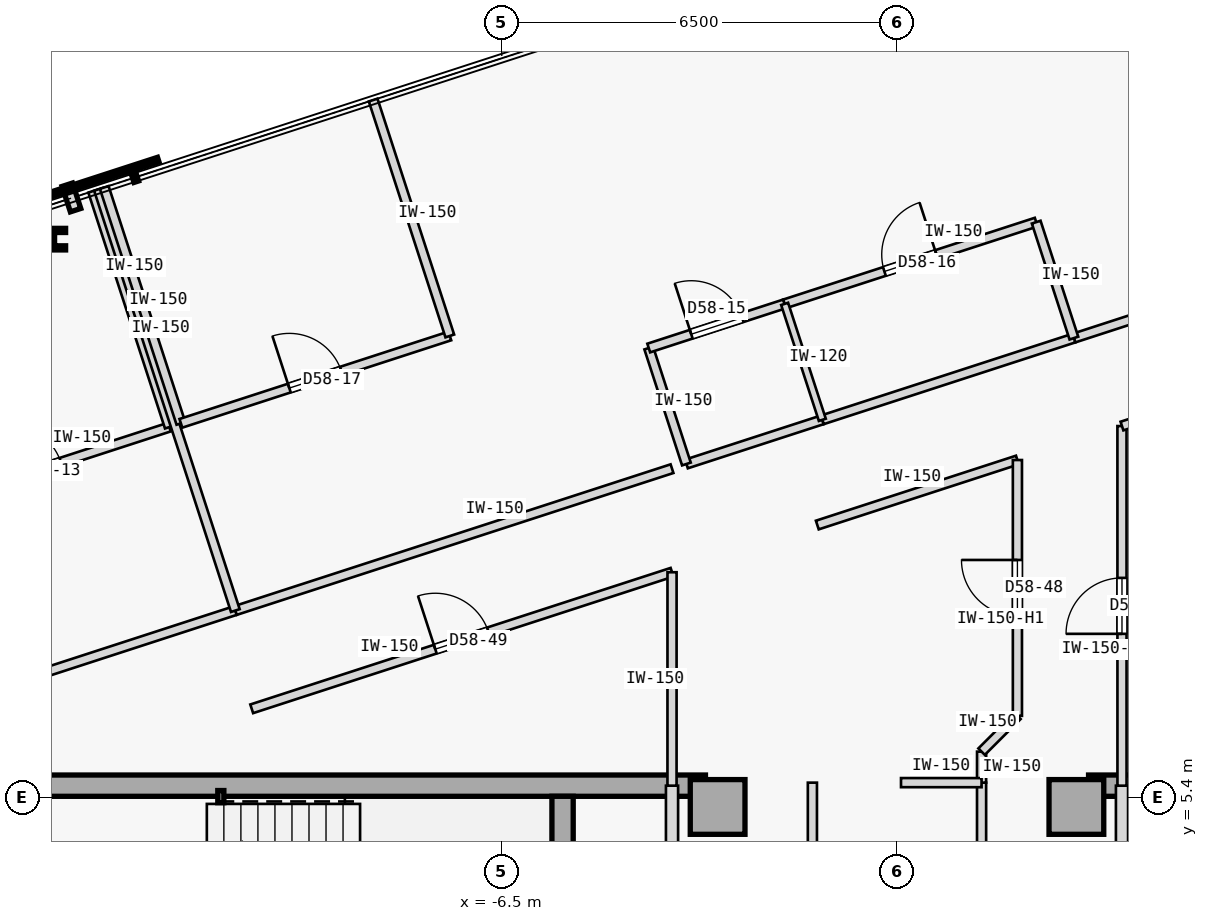
"""IFC4 building model, lengths in metres.
Left out: names, types, materials, properties, quantities, classifications, styles, units other than length and angle.
Written with IfcOpenShell. Run it as: python <this file> out.ifc"""

import sys

from ifc_helpers import new_model, si_unit, direction, frame, frame_2d, origin, origin_2d, place, context, subcontext, project, spatial, rectangle, hollow_rectangle, i_section, extrude, element, fill, save


model = new_model("IFC4")
c1 = context("Model", 3, precision=1e-05, world=origin(), true_north=direction((0.0, 1.0)))
c2 = subcontext(c1, "Body", "Model", "MODEL_VIEW")
j1 = project(units=[si_unit("LENGTHUNIT", "METRE"), si_unit("PLANEANGLEUNIT", "RADIAN")], contexts=[c1])
p1 = place(None, origin())
s1 = spatial("IfcSite", under=j1, at=p1, CompositionType="ELEMENT")
p2 = place(p1, origin())
s2 = spatial("IfcBuilding", under=s1, at=p2, CompositionType="ELEMENT")
p3 = place(p2, frame((0.0, 0.0, 220.95)))
s3 = spatial("IfcBuildingStorey", under=s2, at=p3, CompositionType="ELEMENT", Elevation=220.95)
for number, where, z_axis, x_axis in (
    (1, (-2.95, 5.25, 0.0), (0.0, 0.0, 1.0), (1.0, 0.0, 0.0)),
    (2, (2.95, 5.25, 0.0), (0.0, 0.0, 1.0), (1.0, 0.0, 0.0)),
):
    element("IfcColumn", number, at=place(p3, frame(where, z_axis=z_axis, x_axis=x_axis)), inside=s3, PredefinedType="COLUMN", context=c2, shape_type="SweptSolid", body=[
        extrude(rectangle(XDim=0.9, YDim=0.9, at=origin_2d()), origin(), (0.0, 0.0, 1.0), 3.35),
    ])
p4 = place(p3, frame((-14.56, 5.6, 0.0), z_axis=(0.0, 0.0, 1.0), x_axis=(1.0, 0.0, 0.0)))
e3 = element("IfcWall", 3, at=p4, inside=s3, PredefinedType="SHEAR", context=c2, shape_type="SweptSolid", body=[
    extrude(rectangle(XDim=11.41, YDim=0.35, at=frame_2d((5.705, 0.0))), origin(), (0.0, 0.0, 1.0), 3.125),
])
p5 = place(p3, frame((-5.5, 2.15, 0.0), z_axis=(0.0, 0.0, 1.0), x_axis=(0.0, 1.0, 0.0)))
e4 = element("IfcWall", 4, at=p5, inside=s3, PredefinedType="SHEAR", context=c2, shape_type="SweptSolid", body=[
    extrude(rectangle(XDim=3.275, YDim=0.35, at=frame_2d((1.638, 0.0))), origin(), (0.0, 0.0, 1.0), 3.125),
])
p6 = place(p3, frame((3.15, 5.6, 0.0), z_axis=(0.0, 0.0, 1.0), x_axis=(1.0, 0.0, 0.0)))
e5 = element("IfcWall", 5, at=p6, inside=s3, PredefinedType="SHEAR", context=c2, shape_type="SweptSolid", body=[
    extrude(rectangle(XDim=11.41, YDim=0.35, at=frame_2d((5.705, 0.0))), origin(), (0.0, 0.0, 1.0), 3.125),
])
p7 = place(p3, frame((-11.12, 5.42, 0.0), z_axis=(0.0, 0.0, 1.0), x_axis=(1.0, 0.0, 0.0)))
e6 = element("IfcColumn", 6, at=p7, inside=s3, PredefinedType="COLUMN", context=c2, shape_type="SweptSolid", body=[
    extrude(hollow_rectangle(XDim=0.1, YDim=0.2, WallThickness=0.008, at=origin_2d()), origin(), (0.0, 0.0, 1.0), 3.35),
])
p8 = place(p3, frame((-13.875, 14.587, 0.0), z_axis=(0.0, 0.0, 1.0), x_axis=(1.0, 0.0, 0.0)))
e7 = element("IfcColumn", 7, at=p8, inside=s3, PredefinedType="COLUMN", context=c2, shape_type="SweptSolid", body=[
    extrude(i_section(OverallWidth=0.405, OverallDepth=0.355, WebThickness=0.042, FlangeThickness=0.068, FilletRadius=0.015, at=origin_2d()), origin(), (0.0, 0.0, 1.0), 3.35),
])
p9 = place(p3, frame((-3.7, -1.15, 0.0), z_axis=(0.0, 0.0, 1.0), x_axis=(0.0, 1.0, 0.0)))
e8 = element("IfcWall", 8, at=p9, inside=s3, PredefinedType="STANDARD", context=c2, shape_type="SweptSolid", body=[
    extrude(rectangle(XDim=6.75, YDim=0.2, at=frame_2d((3.375, 0.0))), origin(), (0.0, 0.0, 1.0), 3.125),
])
p10 = place(p9, frame((1.1, 0.0, 0.0)))
e9 = element("IfcOpeningElement", 9, at=p10, cuts=e8, PredefinedType="OPENING", context=c2, shape_type="SweptSolid", body=[
    extrude(rectangle(XDim=0.9, YDim=2.15, at=frame_2d((0.45, 1.075))), frame((0.0, 0.11, 0.0), z_axis=(0.0, -1.0, 0.0), x_axis=(1.0, 0.0, 0.0)), (0.0, 0.0, 1.0), 0.22),
])
p11 = place(p9, frame((4.0, 0.0, 0.0)))
e10 = element("IfcOpeningElement", 10, at=p11, cuts=e8, PredefinedType="OPENING", context=c2, shape_type="SweptSolid", body=[
    extrude(rectangle(XDim=0.92, YDim=2.15, at=frame_2d((0.46, 1.075))), frame((0.0, 0.11, 0.0), z_axis=(0.0, -1.0, 0.0), x_axis=(1.0, 0.0, 0.0)), (0.0, 0.0, 1.0), 0.22),
])
p12 = place(p3, frame((3.7, -1.15, 0.0), z_axis=(0.0, 0.0, 1.0), x_axis=(0.0, 1.0, 0.0)))
e11 = element("IfcWall", 11, at=p12, inside=s3, PredefinedType="STANDARD", context=c2, shape_type="SweptSolid", body=[
    extrude(rectangle(XDim=6.75, YDim=0.2, at=frame_2d((3.375, 0.0))), origin(), (0.0, 0.0, 1.0), 3.125),
])
p13 = place(p12, frame((0.35, 0.0, 0.0)))
e12 = element("IfcOpeningElement", 12, at=p13, cuts=e11, PredefinedType="OPENING", context=c2, shape_type="SweptSolid", body=[
    extrude(rectangle(XDim=0.88, YDim=2.15, at=frame_2d((0.44, 1.075))), frame((0.0, 0.11, 0.0), z_axis=(0.0, -1.0, 0.0), x_axis=(1.0, 0.0, 0.0)), (0.0, 0.0, 1.0), 0.22),
])
p14 = place(p12, frame((2.55, 0.0, 0.0)))
e13 = element("IfcOpeningElement", 13, at=p14, cuts=e11, PredefinedType="OPENING", context=c2, shape_type="SweptSolid", body=[
    extrude(rectangle(XDim=0.92, YDim=2.15, at=frame_2d((0.46, 1.075))), frame((0.0, 0.11, 0.0), z_axis=(0.0, -1.0, 0.0), x_axis=(1.0, 0.0, 0.0)), (0.0, 0.0, 1.0), 0.22),
])
p15 = place(p12, frame((4.22, 0.0, 0.0)))
e14 = element("IfcOpeningElement", 14, at=p15, cuts=e11, PredefinedType="OPENING", context=c2, shape_type="SweptSolid", body=[
    extrude(rectangle(XDim=0.88, YDim=2.15, at=frame_2d((0.44, 1.075))), frame((0.0, 0.11, 0.0), z_axis=(0.0, -1.0, 0.0), x_axis=(1.0, 0.0, 0.0)), (0.0, 0.0, 1.0), 0.22),
])
p16 = place(p3, frame((-1.391, -5.65, 0.0), z_axis=(0.0, 0.0, 1.0), x_axis=(-8.6422954e-05, 0.999999996266, 0.0)))
e15 = element("IfcWall", 15, at=p16, inside=s3, PredefinedType="PARTITIONING", context=c2, shape_type="SweptSolid", body=[
    extrude(rectangle(XDim=11.3, YDim=0.15, at=frame_2d((5.65, 0.0))), origin(), (0.0, 0.0, 1.0), 3.125),
])
p17 = place(p16, frame((5.175, 0.0, 0.0)))
e16 = element("IfcOpeningElement", 16, at=p17, cuts=e15, PredefinedType="OPENING", context=c2, shape_type="SweptSolid", body=[
    extrude(rectangle(XDim=0.95, YDim=2.15, at=frame_2d((0.475, 1.075))), frame((0.0, 0.085, 0.0), z_axis=(0.0, -1.0, 0.0), x_axis=(1.0, 0.0, 0.0)), (0.0, 0.0, 1.0), 0.17),
])
p18 = place(p3, frame((1.391, -5.648, 0.0), z_axis=(0.0, 0.0, 1.0), x_axis=(-4.3218947e-05, 0.999999999066, 0.0)))
e17 = element("IfcWall", 17, at=p18, inside=s3, PredefinedType="PARTITIONING", context=c2, shape_type="SweptSolid", body=[
    extrude(rectangle(XDim=11.298, YDim=0.15, at=frame_2d((5.649, 0.0))), origin(), (0.0, 0.0, 1.0), 3.125),
])
p19 = place(p3, frame((-24.022, 4.21, 0.0), z_axis=(0.0, 0.0, 1.0), x_axis=(0.951058997127, 0.309009359055, 0.0)))
e18 = element("IfcWall", 18, at=p19, inside=s3, PredefinedType="PARTITIONING", context=c2, shape_type="SweptSolid", body=[
    extrude(rectangle(XDim=13.817, YDim=0.15, at=frame_2d((6.908, 0.0))), origin(), (0.0, 0.0, 1.0), 3.125),
])
p20 = place(p19, frame((6.434, 0.0, 0.0)))
e19 = element("IfcOpeningElement", 19, at=p20, cuts=e18, PredefinedType="OPENING", context=c2, shape_type="SweptSolid", body=[
    extrude(rectangle(XDim=0.95, YDim=2.15, at=frame_2d((0.475, 1.075))), frame((0.0, 0.085, 0.0), z_axis=(0.0, -1.0, 0.0), x_axis=(1.0, 0.0, 0.0)), (0.0, 0.0, 1.0), 0.17),
])
p21 = place(p3, frame((-10.882, 8.479, 0.0), z_axis=(0.0, 0.0, 1.0), x_axis=(0.951051887333, 0.309031240494, 0.0)))
e20 = element("IfcWall", 20, at=p21, inside=s3, PredefinedType="PARTITIONING", context=c2, shape_type="SweptSolid", body=[
    extrude(rectangle(XDim=7.551, YDim=0.15, at=frame_2d((3.775, 0.0))), origin(), (0.0, 0.0, 1.0), 3.125),
])
p22 = place(p3, frame((2.909, 12.96, 0.0), z_axis=(0.0, 0.0, 1.0), x_axis=(0.951056113966, 0.309018232614, 0.0)))
e21 = element("IfcWall", 21, at=p22, inside=s3, PredefinedType="PARTITIONING", context=c2, shape_type="SweptSolid", body=[
    extrude(rectangle(XDim=21.076, YDim=0.15, at=frame_2d((10.538, 0.0))), origin(), (0.0, 0.0, 1.0), 3.125),
])
p23 = place(p22, frame((10.063, 0.0, 0.0)))
e22 = element("IfcOpeningElement", 22, at=p23, cuts=e21, PredefinedType="OPENING", context=c2, shape_type="SweptSolid", body=[
    extrude(rectangle(XDim=0.95, YDim=2.15, at=frame_2d((0.475, 1.075))), frame((0.0, 0.085, 0.0), z_axis=(0.0, -1.0, 0.0), x_axis=(1.0, 0.0, 0.0)), (0.0, 0.0, 1.0), 0.17),
])
p24 = place(p3, frame((-3.463, 10.89, 0.0), z_axis=(0.0, 0.0, 1.0), x_axis=(0.951045519245, 0.309050837767, 0.0)))
e23 = element("IfcWall", 23, at=p24, inside=s3, PredefinedType="PARTITIONING", context=c2, shape_type="SweptSolid", body=[
    extrude(rectangle(XDim=2.35, YDim=0.15, at=frame_2d((1.175, 0.0))), origin(), (0.0, 0.0, 1.0), 3.125),
])
p25 = place(p3, frame((-1.228, 11.616, 0.0), z_axis=(0.0, 0.0, 1.0), x_axis=(0.951069122051, 0.308978195154, 0.0)))
e24 = element("IfcWall", 24, at=p25, inside=s3, PredefinedType="PARTITIONING", context=c2, shape_type="SweptSolid", body=[
    extrude(rectangle(XDim=4.35, YDim=0.15, at=frame_2d((2.175, 0.0))), origin(), (0.0, 0.0, 1.0), 3.125),
])
p26 = place(p3, frame((3.7, 5.6, 0.0), z_axis=(0.0, 0.0, 1.0), x_axis=(-0.000123839008, 0.999999992332, 0.0)))
e25 = element("IfcWall", 25, at=p26, inside=s3, PredefinedType="PARTITIONING", context=c2, shape_type="SweptSolid", body=[
    extrude(rectangle(XDim=5.914, YDim=0.15, at=frame_2d((2.957, 0.0))), origin(), (0.0, 0.0, 1.0), 2.675),
])
p27 = place(p26, frame((2.497, 0.0, 0.0)))
e26 = element("IfcOpeningElement", 26, at=p27, cuts=e25, PredefinedType="OPENING", context=c2, shape_type="SweptSolid", body=[
    extrude(rectangle(XDim=0.92, YDim=2.15, at=frame_2d((0.46, 1.075))), frame((0.0, 0.085, 0.0), z_axis=(0.0, -1.0, 0.0), x_axis=(1.0, 0.0, 0.0)), (0.0, 0.0, 1.0), 0.17),
])
p28 = place(p3, frame((3.699, 11.514, 0.0), z_axis=(0.0, 0.0, 1.0), x_axis=(0.951069540665, 0.308976906612, 0.0)))
e27 = element("IfcWall", 27, at=p28, inside=s3, PredefinedType="PARTITIONING", context=c2, shape_type="SweptSolid", body=[
    extrude(rectangle(XDim=1.871, YDim=0.15, at=frame_2d((0.936, 0.0))), origin(), (0.0, 0.0, 1.0), 3.125),
])
p29 = place(p3, frame((-1.311, 9.886, 0.0), z_axis=(0.0, 0.0, 1.0), x_axis=(0.951068803905, 0.308979174442, 0.0)))
e28 = element("IfcWall", 28, at=p29, inside=s3, PredefinedType="PARTITIONING", context=c2, shape_type="SweptSolid", body=[
    extrude(rectangle(XDim=3.46, YDim=0.15, at=frame_2d((1.73, 0.0))), origin(), (0.0, 0.0, 1.0), 3.125),
])
p30 = place(p3, frame((1.391, 5.649, 0.0), z_axis=(0.0, 0.0, 1.0), x_axis=(0.000957395444, 0.999999541697, 0.0)))
e29 = element("IfcWall", 29, at=p30, inside=s3, PredefinedType="PARTITIONING", context=c2, shape_type="SweptSolid", body=[
    extrude(rectangle(XDim=0.51, YDim=0.15, at=frame_2d((0.255, 0.0))), origin(), (0.0, 0.0, 1.0), 3.125),
])
p31 = place(p3, frame((1.391, 6.159, 0.0), z_axis=(0.0, 0.0, 1.0), x_axis=(0.707106781187, 0.707106781187, 0.0)))
e30 = element("IfcWall", 30, at=p31, inside=s3, PredefinedType="PARTITIONING", context=c2, shape_type="SweptSolid", body=[
    extrude(rectangle(XDim=0.833, YDim=0.15, at=frame_2d((0.417, 0.0))), origin(), (0.0, 0.0, 1.0), 3.125),
])
p32 = place(p3, frame((1.98, 6.748, 0.0), z_axis=(0.0, 0.0, 1.0), x_axis=(0.0, 1.0, 0.0)))
e31 = element("IfcWall", 31, at=p32, inside=s3, PredefinedType="PARTITIONING", context=c2, shape_type="SweptSolid", body=[
    extrude(rectangle(XDim=4.207, YDim=0.15, at=frame_2d((2.104, 0.0))), origin(), (0.0, 0.0, 1.0), 2.675),
])
p33 = place(p32, frame((1.643, 0.0, 0.0)))
e32 = element("IfcOpeningElement", 32, at=p33, cuts=e31, PredefinedType="OPENING", context=c2, shape_type="SweptSolid", body=[
    extrude(rectangle(XDim=0.92, YDim=2.15, at=frame_2d((0.46, 1.075))), frame((0.0, 0.085, 0.0), z_axis=(0.0, -1.0, 0.0), x_axis=(1.0, 0.0, 0.0)), (0.0, 0.0, 1.0), 0.17),
])
p34 = place(p3, frame((-10.612, 6.864, 0.0), z_axis=(0.0, 0.0, 1.0), x_axis=(0.951060972078, 0.309003280548, 0.0)))
e33 = element("IfcWall", 33, at=p34, inside=s3, PredefinedType="PARTITIONING", context=c2, shape_type="SweptSolid", body=[
    extrude(rectangle(XDim=7.268, YDim=0.15, at=frame_2d((3.634, 0.0))), origin(), (0.0, 0.0, 1.0), 3.125),
])
p35 = place(p34, frame((3.174, 0.0, 0.0)))
e34 = element("IfcOpeningElement", 34, at=p35, cuts=e33, PredefinedType="OPENING", context=c2, shape_type="SweptSolid", body=[
    extrude(rectangle(XDim=0.92, YDim=2.15, at=frame_2d((0.46, 1.075))), frame((0.0, 0.085, 0.0), z_axis=(0.0, -1.0, 0.0), x_axis=(1.0, 0.0, 0.0)), (0.0, 0.0, 1.0), 0.17),
])
p36 = place(p3, frame((-3.7, 5.6, 0.0), z_axis=(0.0, 0.0, 1.0), x_axis=(0.000139120755, 0.999999990323, 0.0)))
e35 = element("IfcWall", 35, at=p36, inside=s3, PredefinedType="PARTITIONING", context=c2, shape_type="SweptSolid", body=[
    extrude(rectangle(XDim=3.51, YDim=0.15, at=frame_2d((1.755, 0.0))), origin(), (0.0, 0.0, 1.0), 3.125),
])
p37 = place(p3, frame((0.066, 5.65, 0.0), z_axis=(0.0, 0.0, 1.0), x_axis=(0.999999932094, -0.000368527707, 0.0)))
e36 = element("IfcWall", 36, at=p37, inside=s3, PredefinedType="PARTITIONING", context=c2, shape_type="SweptSolid", body=[
    extrude(rectangle(XDim=1.325, YDim=0.15, at=frame_2d((0.663, 0.0))), origin(), (0.0, 0.0, 1.0), 3.125),
])
p38 = place(p3, frame((-16.389, 10.06, 0.0), z_axis=(0.0, 0.0, 1.0), x_axis=(0.951050272606, 0.309036209813, 0.0)))
e37 = element("IfcWall", 37, at=p38, inside=s3, PredefinedType="PARTITIONING", context=c2, shape_type="SweptSolid", body=[
    extrude(rectangle(XDim=4.65, YDim=0.15, at=frame_2d((2.325, 0.0))), origin(), (0.0, 0.0, 1.0), 3.125),
])
p39 = place(p38, frame((1.875, 0.0, 0.0)))
e38 = element("IfcOpeningElement", 38, at=p39, cuts=e37, PredefinedType="OPENING", context=c2, shape_type="SweptSolid", body=[
    extrude(rectangle(XDim=0.9, YDim=2.15, at=frame_2d((0.45, 1.075))), frame((0.0, 0.085, 0.0), z_axis=(0.0, -1.0, 0.0), x_axis=(1.0, 0.0, 0.0)), (0.0, 0.0, 1.0), 0.17),
])
p40 = place(p3, frame((-11.967, 11.497, 0.0), z_axis=(0.0, 0.0, 1.0), x_axis=(-0.309018403393, 0.951056058476, 0.0)))
e39 = element("IfcWall", 39, at=p40, inside=s3, PredefinedType="PARTITIONING", context=c2, shape_type="SweptSolid", body=[
    extrude(rectangle(XDim=4.079, YDim=0.15, at=frame_2d((2.04, 0.0))), origin(), (0.0, 0.0, 1.0), 3.125),
])
p41 = place(p3, frame((-10.882, 8.479, 0.0), z_axis=(0.0, 0.0, 1.0), x_axis=(-0.308998913866, 0.951062390819, 0.0)))
e40 = element("IfcWall", 40, at=p41, inside=s3, PredefinedType="PARTITIONING", context=c2, shape_type="SweptSolid", body=[
    extrude(rectangle(XDim=7.284, YDim=0.15, at=frame_2d((3.642, 0.0))), origin(), (0.0, 0.0, 1.0), 3.125),
])
p42 = place(p3, frame((-3.463, 10.89, 0.0), z_axis=(0.0, 0.0, 1.0), x_axis=(-0.308912611775, 0.951090425925, 0.0)))
e41 = element("IfcWall", 41, at=p42, inside=s3, PredefinedType="PARTITIONING", context=c2, shape_type="SweptSolid", body=[
    extrude(rectangle(XDim=2.005, YDim=0.15, at=frame_2d((1.002, 0.0))), origin(), (0.0, 0.0, 1.0), 3.125),
])
p43 = place(p3, frame((-4.083, 12.797, 0.0), z_axis=(0.0, 0.0, 1.0), x_axis=(0.951066131077, 0.308987401554, 0.0)))
e42 = element("IfcWall", 42, at=p43, inside=s3, PredefinedType="PARTITIONING", context=c2, shape_type="SweptSolid", body=[
    extrude(rectangle(XDim=2.35, YDim=0.15, at=frame_2d((1.175, 0.0))), origin(), (0.0, 0.0, 1.0), 3.125),
])
p44 = place(p43, frame((0.735, 0.0, 0.0)))
e43 = element("IfcOpeningElement", 43, at=p44, cuts=e42, PredefinedType="OPENING", context=c2, shape_type="SweptSolid", body=[
    extrude(rectangle(XDim=0.88, YDim=2.15, at=frame_2d((0.44, 1.075))), frame((0.0, 0.085, 0.0), z_axis=(0.0, -1.0, 0.0), x_axis=(1.0, 0.0, 0.0)), (0.0, 0.0, 1.0), 0.17),
])
p45 = place(p3, frame((-1.848, 13.523, 0.0), z_axis=(0.0, 0.0, 1.0), x_axis=(0.951057987102, 0.309012467661, 0.0)))
e44 = element("IfcWall", 44, at=p45, inside=s3, PredefinedType="PARTITIONING", context=c2, shape_type="SweptSolid", body=[
    extrude(rectangle(XDim=4.35, YDim=0.15, at=frame_2d((2.175, 0.0))), origin(), (0.0, 0.0, 1.0), 3.125),
])
p46 = place(p45, frame((1.725, 0.0, 0.0)))
e45 = element("IfcOpeningElement", 45, at=p46, cuts=e44, PredefinedType="OPENING", context=c2, shape_type="SweptSolid", body=[
    extrude(rectangle(XDim=0.9, YDim=2.15, at=frame_2d((0.45, 1.075))), frame((0.0, 0.085, 0.0), z_axis=(0.0, -1.0, 0.0), x_axis=(1.0, 0.0, 0.0)), (0.0, 0.0, 1.0), 0.17),
])
p47 = place(p3, frame((2.909, 12.96, 0.0), z_axis=(0.0, 0.0, 1.0), x_axis=(-0.308912611775, 0.951090425925, 0.0)))
e46 = element("IfcWall", 46, at=p47, inside=s3, PredefinedType="PARTITIONING", context=c2, shape_type="SweptSolid", body=[
    extrude(rectangle(XDim=2.005, YDim=0.15, at=frame_2d((1.002, 0.0))), origin(), (0.0, 0.0, 1.0), 3.125),
])
p48 = place(p3, frame((-11.777, 11.559, 0.0), z_axis=(0.0, 0.0, 1.0), x_axis=(-0.309018403393, 0.951056058476, 0.0)))
e47 = element("IfcWall", 47, at=p48, inside=s3, PredefinedType="PARTITIONING", context=c2, shape_type="SweptSolid", body=[
    extrude(rectangle(XDim=4.079, YDim=0.15, at=frame_2d((2.04, 0.0))), origin(), (0.0, 0.0, 1.0), 3.125),
])
p49 = place(p3, frame((-11.777, 11.559, 0.0), z_axis=(0.0, 0.0, 1.0), x_axis=(0.951050272606, 0.309036209813, 0.0)))
e48 = element("IfcWall", 48, at=p49, inside=s3, PredefinedType="PARTITIONING", context=c2, shape_type="SweptSolid", body=[
    extrude(rectangle(XDim=4.65, YDim=0.15, at=frame_2d((2.325, 0.0))), origin(), (0.0, 0.0, 1.0), 3.125),
])
p50 = place(p49, frame((1.875, 0.0, 0.0)))
e49 = element("IfcOpeningElement", 49, at=p50, cuts=e48, PredefinedType="OPENING", context=c2, shape_type="SweptSolid", body=[
    extrude(rectangle(XDim=0.9, YDim=2.15, at=frame_2d((0.45, 1.075))), frame((0.0, 0.085, 0.0), z_axis=(0.0, -1.0, 0.0), x_axis=(1.0, 0.0, 0.0)), (0.0, 0.0, 1.0), 0.17),
])
p51 = place(p3, frame((-7.354, 12.996, 0.0), z_axis=(0.0, 0.0, 1.0), x_axis=(-0.309018403393, 0.951056058476, 0.0)))
e50 = element("IfcWall", 50, at=p51, inside=s3, PredefinedType="PARTITIONING", context=c2, shape_type="SweptSolid", body=[
    extrude(rectangle(XDim=4.079, YDim=0.15, at=frame_2d((2.04, 0.0))), origin(), (0.0, 0.0, 1.0), 3.125),
])
p52 = place(p3, frame((-1.228, 11.616, 0.0), z_axis=(0.0, 0.0, 1.0), x_axis=(-0.309058537449, 0.951043017129, 0.0)))
e51 = element("IfcWall", 51, at=p52, inside=s3, PredefinedType="PARTITIONING", context=c2, shape_type="SweptSolid", body=[
    extrude(rectangle(XDim=2.005, YDim=0.12, at=frame_2d((1.002, 0.0))), origin(), (0.0, 0.0, 1.0), 3.125),
])
p53 = place(p39, origin())
e52 = element("IfcDoor", 52, at=p53, inside=s3, OperationType="SINGLE_SWING_LEFT", PredefinedType="DOOR", context=c2, shape_type="SweptSolid", body=[
    extrude(rectangle(XDim=0.9, YDim=2.15, at=frame_2d((0.45, 1.075))), frame((0.0, 0.025, 0.0), z_axis=(0.0, -1.0, 0.0), x_axis=(1.0, 0.0, 0.0)), (0.0, 0.0, 1.0), 0.05),
])
fill(e38, e52)
p54 = place(p44, origin())
e53 = element("IfcDoor", 53, at=p54, inside=s3, OperationType="SINGLE_SWING_LEFT", PredefinedType="DOOR", context=c2, shape_type="SweptSolid", body=[
    extrude(rectangle(XDim=0.88, YDim=2.15, at=frame_2d((0.44, 1.075))), frame((0.0, 0.025, 0.0), z_axis=(0.0, -1.0, 0.0), x_axis=(1.0, 0.0, 0.0)), (0.0, 0.0, 1.0), 0.05),
])
fill(e43, e53)
p55 = place(p46, origin())
e54 = element("IfcDoor", 54, at=p55, inside=s3, OperationType="SINGLE_SWING_RIGHT", PredefinedType="DOOR", context=c2, shape_type="SweptSolid", body=[
    extrude(rectangle(XDim=0.9, YDim=2.15, at=frame_2d((0.45, 1.075))), frame((0.0, 0.025, 0.0), z_axis=(0.0, -1.0, 0.0), x_axis=(1.0, 0.0, 0.0)), (0.0, 0.0, 1.0), 0.05),
])
fill(e45, e54)
p56 = place(p50, origin())
e55 = element("IfcDoor", 55, at=p56, inside=s3, OperationType="SINGLE_SWING_LEFT", PredefinedType="DOOR", context=c2, shape_type="SweptSolid", body=[
    extrude(rectangle(XDim=0.9, YDim=2.15, at=frame_2d((0.45, 1.075))), frame((0.0, 0.025, 0.0), z_axis=(0.0, -1.0, 0.0), x_axis=(1.0, 0.0, 0.0)), (0.0, 0.0, 1.0), 0.05),
])
fill(e49, e55)
p57 = place(p27, origin())
e56 = element("IfcDoor", 56, at=p57, inside=s3, OperationType="SINGLE_SWING_LEFT", PredefinedType="DOOR", context=c2, shape_type="SweptSolid", body=[
    extrude(rectangle(XDim=0.92, YDim=2.15, at=frame_2d((0.46, 1.075))), frame((0.0, 0.025, 0.0), z_axis=(0.0, -1.0, 0.0), x_axis=(1.0, 0.0, 0.0)), (0.0, 0.0, 1.0), 0.05),
])
fill(e26, e56)
p58 = place(p33, origin())
e57 = element("IfcDoor", 57, at=p58, inside=s3, OperationType="SINGLE_SWING_RIGHT", PredefinedType="DOOR", context=c2, shape_type="SweptSolid", body=[
    extrude(rectangle(XDim=0.92, YDim=2.15, at=frame_2d((0.46, 1.075))), frame((0.0, 0.025, 0.0), z_axis=(0.0, -1.0, 0.0), x_axis=(1.0, 0.0, 0.0)), (0.0, 0.0, 1.0), 0.05),
])
fill(e32, e57)
p59 = place(p35, origin())
e58 = element("IfcDoor", 58, at=p59, inside=s3, OperationType="SINGLE_SWING_LEFT", PredefinedType="DOOR", context=c2, shape_type="SweptSolid", body=[
    extrude(rectangle(XDim=0.92, YDim=2.15, at=frame_2d((0.46, 1.075))), frame((0.0, 0.025, 0.0), z_axis=(0.0, -1.0, 0.0), x_axis=(1.0, 0.0, 0.0)), (0.0, 0.0, 1.0), 0.05),
])
fill(e34, e58)
save(model, sys.argv[1])
